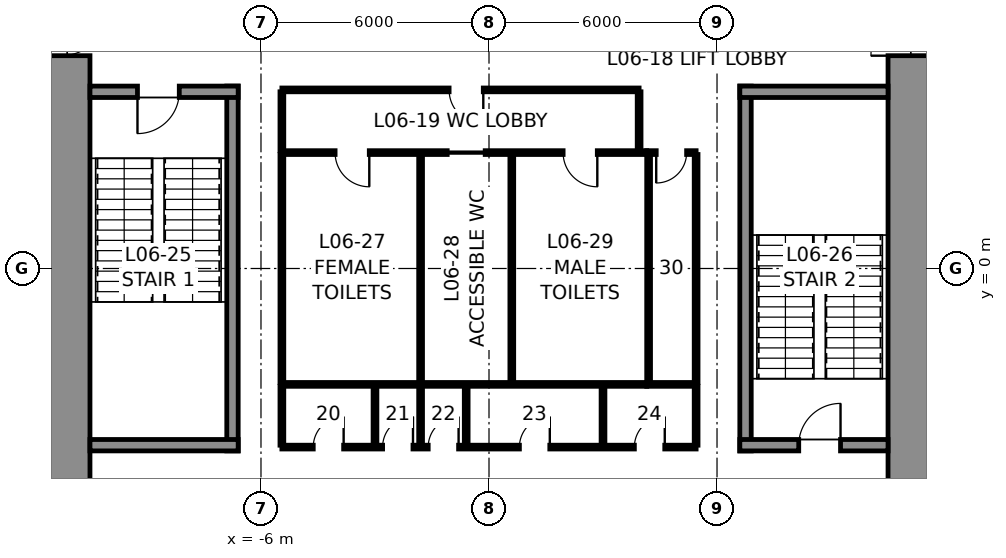
"""IFC4 building model, lengths in metres.
Left out: names, types, materials, properties, quantities, classifications, styles, units other than length and angle.
Written with IfcOpenShell. Run it as: python <this file> out.ifc"""

import sys

from ifc_helpers import new_model, si_unit, direction, frame, frame_2d, origin, place, context, subcontext, project, spatial, rectangle, extrude, element, fill, save


model = new_model("IFC4")
c1 = context("Model", 3, precision=1e-05, world=origin(), true_north=direction((0.0, 1.0)))
c2 = subcontext(c1, "Body", "Model", "MODEL_VIEW")
j1 = project(units=[si_unit("LENGTHUNIT", "METRE"), si_unit("PLANEANGLEUNIT", "RADIAN")], contexts=[c1])
p1 = place(None, origin())
s1 = spatial("IfcSite", under=j1, at=p1, CompositionType="ELEMENT")
p2 = place(p1, origin())
s2 = spatial("IfcBuilding", under=s1, at=p2, CompositionType="ELEMENT")
p3 = place(p2, frame((0.0, 0.0, 32.0)))
s3 = spatial("IfcBuildingStorey", under=s2, at=p3, CompositionType="ELEMENT", Elevation=32.0)
p4 = place(p3, frame((11.25, 10.5, 0.0), z_axis=(0.0, 0.0, 1.0), x_axis=(0.0, -1.0, 0.0)))
e1 = element("IfcWall", 1, at=p4, inside=s3, PredefinedType="SHEAR", context=c2, shape_type="SweptSolid", body=[
    extrude(rectangle(XDim=21.0, YDim=1.5, at=frame_2d((10.5, 0.0))), origin(), (0.0, 0.0, 1.0), 5.5),
])
p5 = place(p4, frame((3.7, 0.0, 0.0)))
e2 = element("IfcOpeningElement", 2, at=p5, cuts=e1, PredefinedType="OPENING", context=c2, shape_type="SweptSolid", body=[
    extrude(rectangle(XDim=1.2, YDim=2.3, at=frame_2d((0.6, 1.15))), frame((0.0, 0.76, 0.0), z_axis=(0.0, -1.0, 0.0), x_axis=(1.0, 0.0, 0.0)), (0.0, 0.0, 1.0), 1.52),
])
p6 = place(p4, frame((16.1, 0.0, 0.0)))
e3 = element("IfcOpeningElement", 3, at=p6, cuts=e1, PredefinedType="OPENING", context=c2, shape_type="SweptSolid", body=[
    extrude(rectangle(XDim=1.2, YDim=2.3, at=frame_2d((0.6, 1.15))), frame((0.0, 0.76, 0.0), z_axis=(0.0, -1.0, 0.0), x_axis=(1.0, 0.0, 0.0)), (0.0, 0.0, 1.0), 1.52),
])
p7 = place(p3, frame((-11.25, -10.5, 0.0), z_axis=(0.0, 0.0, 1.0), x_axis=(0.0, 1.0, 0.0)))
e4 = element("IfcWall", 4, at=p7, inside=s3, PredefinedType="SHEAR", context=c2, shape_type="SweptSolid", body=[
    extrude(rectangle(XDim=21.0, YDim=1.5, at=frame_2d((10.5, 0.0))), origin(), (0.0, 0.0, 1.0), 5.5),
])
p8 = place(p7, frame((16.1, 0.0, 0.0)))
e5 = element("IfcOpeningElement", 5, at=p8, cuts=e4, PredefinedType="OPENING", context=c2, shape_type="SweptSolid", body=[
    extrude(rectangle(XDim=1.2, YDim=2.3, at=frame_2d((0.6, 1.15))), frame((0.0, 0.76, 0.0), z_axis=(0.0, -1.0, 0.0), x_axis=(1.0, 0.0, 0.0)), (0.0, 0.0, 1.0), 1.52),
])
p9 = place(p7, frame((3.7, 0.0, 0.0)))
e6 = element("IfcOpeningElement", 6, at=p9, cuts=e4, PredefinedType="OPENING", context=c2, shape_type="SweptSolid", body=[
    extrude(rectangle(XDim=1.2, YDim=2.3, at=frame_2d((0.6, 1.15))), frame((0.0, 0.76, 0.0), z_axis=(0.0, -1.0, 0.0), x_axis=(1.0, 0.0, 0.0)), (0.0, 0.0, 1.0), 1.52),
])
p10 = place(p3, frame((-6.75, -4.8, 0.0), z_axis=(0.0, 0.0, 1.0), x_axis=(0.0, 1.0, 0.0)))
e7 = element("IfcWall", 7, at=p10, inside=s3, PredefinedType="SOLIDWALL", context=c2, shape_type="SweptSolid", body=[
    extrude(rectangle(XDim=9.6, YDim=0.3, at=frame_2d((4.8, 0.0))), origin(), (0.0, 0.0, 1.0), 5.25),
])
p11 = place(p3, frame((-10.5, 4.65, 0.0), z_axis=(0.0, 0.0, 1.0), x_axis=(1.0, 0.0, 0.0)))
e8 = element("IfcWall", 8, at=p11, inside=s3, PredefinedType="SOLIDWALL", context=c2, shape_type="SweptSolid", body=[
    extrude(rectangle(XDim=3.9, YDim=0.3, at=frame_2d((1.95, 0.0))), origin(), (0.0, 0.0, 1.0), 5.25),
])
p12 = place(p11, frame((1.25, 0.0, 0.0)))
e9 = element("IfcOpeningElement", 9, at=p12, cuts=e8, PredefinedType="OPENING", context=c2, shape_type="SweptSolid", body=[
    extrude(rectangle(XDim=1.1, YDim=2.3, at=frame_2d((0.55, 1.15))), frame((0.0, 0.16, 0.0), z_axis=(0.0, -1.0, 0.0), x_axis=(1.0, 0.0, 0.0)), (0.0, 0.0, 1.0), 0.32),
])
p13 = place(p3, frame((-6.6, -4.65, 0.0), z_axis=(0.0, 0.0, 1.0), x_axis=(-1.0, 0.0, 0.0)))
e10 = element("IfcWall", 10, at=p13, inside=s3, PredefinedType="SOLIDWALL", context=c2, shape_type="SweptSolid", body=[
    extrude(rectangle(XDim=3.9, YDim=0.3, at=frame_2d((1.95, 0.0))), origin(), (0.0, 0.0, 1.0), 5.25),
])
p14 = place(p3, frame((6.75, -4.8, 0.0), z_axis=(0.0, 0.0, 1.0), x_axis=(0.0, 1.0, 0.0)))
e11 = element("IfcWall", 11, at=p14, inside=s3, PredefinedType="SOLIDWALL", context=c2, shape_type="SweptSolid", body=[
    extrude(rectangle(XDim=9.6, YDim=0.3, at=frame_2d((4.8, 0.0))), origin(), (0.0, 0.0, 1.0), 5.25),
])
p15 = place(p3, frame((6.6, 4.65, 0.0), z_axis=(0.0, 0.0, 1.0), x_axis=(1.0, 0.0, 0.0)))
e12 = element("IfcWall", 12, at=p15, inside=s3, PredefinedType="SOLIDWALL", context=c2, shape_type="SweptSolid", body=[
    extrude(rectangle(XDim=3.9, YDim=0.3, at=frame_2d((1.95, 0.0))), origin(), (0.0, 0.0, 1.0), 5.25),
])
p16 = place(p3, frame((10.5, -4.65, 0.0), z_axis=(0.0, 0.0, 1.0), x_axis=(-1.0, 0.0, 0.0)))
e13 = element("IfcWall", 13, at=p16, inside=s3, PredefinedType="SOLIDWALL", context=c2, shape_type="SweptSolid", body=[
    extrude(rectangle(XDim=3.9, YDim=0.3, at=frame_2d((1.95, 0.0))), origin(), (0.0, 0.0, 1.0), 5.25),
])
p17 = place(p16, frame((1.25, 0.0, 0.0)))
e14 = element("IfcOpeningElement", 14, at=p17, cuts=e13, PredefinedType="OPENING", context=c2, shape_type="SweptSolid", body=[
    extrude(rectangle(XDim=1.1, YDim=2.3, at=frame_2d((0.55, 1.15))), frame((0.0, 0.16, 0.0), z_axis=(0.0, -1.0, 0.0), x_axis=(1.0, 0.0, 0.0)), (0.0, 0.0, 1.0), 0.32),
])
p18 = place(p3, frame((-5.45, 3.05, 0.0), z_axis=(0.0, 0.0, 1.0), x_axis=(1.0, 0.0, 0.0)))
e15 = element("IfcWall", 15, at=p18, inside=s3, PredefinedType="PARTITIONING", context=c2, shape_type="SweptSolid", body=[
    extrude(rectangle(XDim=9.6, YDim=0.1, at=frame_2d((4.8, 0.0))), origin(), (0.0, 0.0, 1.0), 5.25),
])
p19 = place(p18, frame((1.4, 0.0, 0.0)))
e16 = element("IfcOpeningElement", 16, at=p19, cuts=e15, PredefinedType="OPENING", context=c2, shape_type="SweptSolid", body=[
    extrude(rectangle(XDim=0.9, YDim=2.3, at=frame_2d((0.45, 1.15))), frame((0.0, 0.06, 0.0), z_axis=(0.0, -1.0, 0.0), x_axis=(1.0, 0.0, 0.0)), (0.0, 0.0, 1.0), 0.12),
])
p20 = place(p18, frame((4.35, 0.0, 0.0)))
e17 = element("IfcOpeningElement", 17, at=p20, cuts=e15, PredefinedType="OPENING", context=c2, shape_type="SweptSolid", body=[
    extrude(rectangle(XDim=1.0, YDim=2.3, at=frame_2d((0.5, 1.15))), frame((0.0, 0.06, 0.0), z_axis=(0.0, -1.0, 0.0), x_axis=(1.0, 0.0, 0.0)), (0.0, 0.0, 1.0), 0.12),
])
p21 = place(p18, frame((7.4, 0.0, 0.0)))
e18 = element("IfcOpeningElement", 18, at=p21, cuts=e15, PredefinedType="OPENING", context=c2, shape_type="SweptSolid", body=[
    extrude(rectangle(XDim=0.9, YDim=2.3, at=frame_2d((0.45, 1.15))), frame((0.0, 0.06, 0.0), z_axis=(0.0, -1.0, 0.0), x_axis=(1.0, 0.0, 0.0)), (0.0, 0.0, 1.0), 0.12),
])
p22 = place(p3, frame((4.15, 3.05, 0.0), z_axis=(0.0, 0.0, 1.0), x_axis=(1.0, 0.0, 0.0)))
e19 = element("IfcWall", 19, at=p22, inside=s3, PredefinedType="PARTITIONING", context=c2, shape_type="SweptSolid", body=[
    extrude(rectangle(XDim=1.3, YDim=0.1, at=frame_2d((0.65, 0.0))), origin(), (0.0, 0.0, 1.0), 5.25),
])
p23 = place(p22, frame((0.25, 0.0, 0.0)))
e20 = element("IfcOpeningElement", 20, at=p23, cuts=e19, PredefinedType="OPENING", context=c2, shape_type="SweptSolid", body=[
    extrude(rectangle(XDim=0.8, YDim=2.3, at=frame_2d((0.4, 1.15))), frame((0.0, 0.06, 0.0), z_axis=(0.0, -1.0, 0.0), x_axis=(1.0, 0.0, 0.0)), (0.0, 0.0, 1.0), 0.12),
])
p24 = place(p3, frame((4.15, -3.05, 0.0), z_axis=(0.0, 0.0, 1.0), x_axis=(-1.0, 0.0, 0.0)))
e21 = element("IfcWall", 21, at=p24, inside=s3, PredefinedType="PARTITIONING", context=c2, shape_type="SweptSolid", body=[
    extrude(rectangle(XDim=9.6, YDim=0.1, at=frame_2d((4.8, 0.0))), origin(), (0.0, 0.0, 1.0), 5.25),
])
p25 = place(p3, frame((5.45, -3.05, 0.0), z_axis=(0.0, 0.0, 1.0), x_axis=(-1.0, 0.0, 0.0)))
e22 = element("IfcWall", 22, at=p25, inside=s3, PredefinedType="PARTITIONING", context=c2, shape_type="SweptSolid", body=[
    extrude(rectangle(XDim=1.3, YDim=0.1, at=frame_2d((0.65, 0.0))), origin(), (0.0, 0.0, 1.0), 5.25),
])
for number, where, z_axis, x_axis in (
    (23, (5.45, 3.0, 0.0), (0.0, 0.0, 1.0), (0.0, -1.0, 0.0)),
    (24, (-5.45, -3.0, 0.0), (0.0, 0.0, 1.0), (0.0, 1.0, 0.0)),
    (25, (-1.8, -3.0, 0.0), (0.0, 0.0, 1.0), (0.0, 1.0, 0.0)),
    (26, (0.6, -3.0, 0.0), (0.0, 0.0, 1.0), (0.0, 1.0, 0.0)),
    (27, (4.2, -3.0, 0.0), (0.0, 0.0, 1.0), (0.0, 1.0, 0.0)),
):
    element("IfcWall", number, at=place(p3, frame(where, z_axis=z_axis, x_axis=x_axis)), inside=s3, PredefinedType="PARTITIONING", context=c2, shape_type="SweptSolid", body=[
        extrude(rectangle(XDim=6.0, YDim=0.1, at=frame_2d((3.0, 0.0))), origin(), (0.0, 0.0, 1.0), 5.25),
    ])
p26 = place(p3, frame((-5.45, 4.7, 0.0), z_axis=(0.0, 0.0, 1.0), x_axis=(1.0, 0.0, 0.0)))
e28 = element("IfcWall", 28, at=p26, inside=s3, PredefinedType="PARTITIONING", context=c2, shape_type="SweptSolid", body=[
    extrude(rectangle(XDim=9.4, YDim=0.1, at=frame_2d((4.7, 0.0))), origin(), (0.0, 0.0, 1.0), 5.25),
])
p27 = place(p26, frame((4.4, 0.0, 0.0)))
e29 = element("IfcOpeningElement", 29, at=p27, cuts=e28, PredefinedType="OPENING", context=c2, shape_type="SweptSolid", body=[
    extrude(rectangle(XDim=0.9, YDim=2.3, at=frame_2d((0.45, 1.15))), frame((0.0, 0.06, 0.0), z_axis=(0.0, -1.0, 0.0), x_axis=(1.0, 0.0, 0.0)), (0.0, 0.0, 1.0), 0.12),
])
for number, where, z_axis, x_axis in (
    (30, (-5.45, 3.1, 0.0), (0.0, 0.0, 1.0), (0.0, 1.0, 0.0)),
    (31, (3.95, 3.1, 0.0), (0.0, 0.0, 1.0), (0.0, 1.0, 0.0)),
):
    element("IfcWall", number, at=place(p3, frame(where, z_axis=z_axis, x_axis=x_axis)), inside=s3, PredefinedType="PARTITIONING", context=c2, shape_type="SweptSolid", body=[
        extrude(rectangle(XDim=1.55, YDim=0.1, at=frame_2d((0.775, 0.0))), origin(), (0.0, 0.0, 1.0), 5.25),
    ])
p28 = place(p3, frame((5.45, -4.7, 0.0), z_axis=(0.0, 0.0, 1.0), x_axis=(-1.0, 0.0, 0.0)))
e32 = element("IfcWall", 32, at=p28, inside=s3, PredefinedType="PARTITIONING", context=c2, shape_type="SweptSolid", body=[
    extrude(rectangle(XDim=10.9, YDim=0.1, at=frame_2d((5.45, 0.0))), origin(), (0.0, 0.0, 1.0), 5.25),
])
p29 = place(p28, frame((9.275, 0.0, 0.0)))
e33 = element("IfcOpeningElement", 33, at=p29, cuts=e32, PredefinedType="OPENING", context=c2, shape_type="SweptSolid", body=[
    extrude(rectangle(XDim=0.8, YDim=2.3, at=frame_2d((0.4, 1.15))), frame((0.0, 0.06, 0.0), z_axis=(0.0, -1.0, 0.0), x_axis=(1.0, 0.0, 0.0)), (0.0, 0.0, 1.0), 0.12),
])
p30 = place(p28, frame((7.45, 0.0, 0.0)))
e34 = element("IfcOpeningElement", 34, at=p30, cuts=e32, PredefinedType="OPENING", context=c2, shape_type="SweptSolid", body=[
    extrude(rectangle(XDim=0.8, YDim=2.3, at=frame_2d((0.4, 1.15))), frame((0.0, 0.06, 0.0), z_axis=(0.0, -1.0, 0.0), x_axis=(1.0, 0.0, 0.0)), (0.0, 0.0, 1.0), 0.12),
])
p31 = place(p28, frame((6.25, 0.0, 0.0)))
e35 = element("IfcOpeningElement", 35, at=p31, cuts=e32, PredefinedType="OPENING", context=c2, shape_type="SweptSolid", body=[
    extrude(rectangle(XDim=0.8, YDim=2.3, at=frame_2d((0.4, 1.15))), frame((0.0, 0.06, 0.0), z_axis=(0.0, -1.0, 0.0), x_axis=(1.0, 0.0, 0.0)), (0.0, 0.0, 1.0), 0.12),
])
p32 = place(p28, frame((3.85, 0.0, 0.0)))
e36 = element("IfcOpeningElement", 36, at=p32, cuts=e32, PredefinedType="OPENING", context=c2, shape_type="SweptSolid", body=[
    extrude(rectangle(XDim=0.8, YDim=2.3, at=frame_2d((0.4, 1.15))), frame((0.0, 0.06, 0.0), z_axis=(0.0, -1.0, 0.0), x_axis=(1.0, 0.0, 0.0)), (0.0, 0.0, 1.0), 0.12),
])
p33 = place(p28, frame((0.825, 0.0, 0.0)))
e37 = element("IfcOpeningElement", 37, at=p33, cuts=e32, PredefinedType="OPENING", context=c2, shape_type="SweptSolid", body=[
    extrude(rectangle(XDim=0.8, YDim=2.3, at=frame_2d((0.4, 1.15))), frame((0.0, 0.06, 0.0), z_axis=(0.0, -1.0, 0.0), x_axis=(1.0, 0.0, 0.0)), (0.0, 0.0, 1.0), 0.12),
])
for number, where, z_axis, x_axis in (
    (38, (-5.45, -3.1, 0.0), (0.0, 0.0, 1.0), (0.0, -1.0, 0.0)),
    (39, (5.45, -3.1, 0.0), (0.0, 0.0, 1.0), (0.0, -1.0, 0.0)),
    (40, (-3.0, -3.1, 0.0), (0.0, 0.0, 1.0), (0.0, -1.0, 0.0)),
    (41, (-1.8, -3.1, 0.0), (0.0, 0.0, 1.0), (0.0, -1.0, 0.0)),
    (42, (-0.6, -3.1, 0.0), (0.0, 0.0, 1.0), (0.0, -1.0, 0.0)),
    (43, (3.0, -3.1, 0.0), (0.0, 0.0, 1.0), (0.0, -1.0, 0.0)),
):
    element("IfcWall", number, at=place(p3, frame(where, z_axis=z_axis, x_axis=x_axis)), inside=s3, PredefinedType="PARTITIONING", context=c2, shape_type="SweptSolid", body=[
        extrude(rectangle(XDim=1.55, YDim=0.1, at=frame_2d((0.775, 0.0))), origin(), (0.0, 0.0, 1.0), 5.25),
    ])
p34 = place(p12, frame((1.1, 0.0, 0.0), z_axis=(0.0, 0.0, 1.0), x_axis=(-1.0, 0.0, 0.0)))
e44 = element("IfcDoor", 44, at=p34, inside=s3, OperationType="SINGLE_SWING_RIGHT", PredefinedType="DOOR", context=c2, shape_type="SweptSolid", body=[
    extrude(rectangle(XDim=1.1, YDim=2.3, at=frame_2d((0.55, 1.15))), frame((0.0, 0.025, 0.0), z_axis=(0.0, -1.0, 0.0), x_axis=(1.0, 0.0, 0.0)), (0.0, 0.0, 1.0), 0.05),
])
fill(e9, e44)
p35 = place(p17, frame((1.1, 0.0, 0.0), z_axis=(0.0, 0.0, 1.0), x_axis=(-1.0, 0.0, 0.0)))
e45 = element("IfcDoor", 45, at=p35, inside=s3, OperationType="SINGLE_SWING_RIGHT", PredefinedType="DOOR", context=c2, shape_type="SweptSolid", body=[
    extrude(rectangle(XDim=1.1, YDim=2.3, at=frame_2d((0.55, 1.15))), frame((0.0, 0.025, 0.0), z_axis=(0.0, -1.0, 0.0), x_axis=(1.0, 0.0, 0.0)), (0.0, 0.0, 1.0), 0.05),
])
fill(e14, e45)
p36 = place(p19, frame((0.9, 0.0, 0.0), z_axis=(0.0, 0.0, 1.0), x_axis=(-1.0, 0.0, 0.0)))
e46 = element("IfcDoor", 46, at=p36, inside=s3, OperationType="SINGLE_SWING_LEFT", PredefinedType="DOOR", context=c2, shape_type="SweptSolid", body=[
    extrude(rectangle(XDim=0.9, YDim=2.3, at=frame_2d((0.45, 1.15))), frame((0.0, 0.025, 0.0), z_axis=(0.0, -1.0, 0.0), x_axis=(1.0, 0.0, 0.0)), (0.0, 0.0, 1.0), 0.05),
])
fill(e16, e46)
p37 = place(p20, frame((1.0, 0.0, 0.0), z_axis=(0.0, 0.0, 1.0), x_axis=(-1.0, 0.0, 0.0)))
e47 = element("IfcDoor", 47, at=p37, inside=s3, OperationType="SLIDING_TO_LEFT", PredefinedType="DOOR", context=c2, shape_type="SweptSolid", body=[
    extrude(rectangle(XDim=1.0, YDim=2.3, at=frame_2d((0.5, 1.15))), frame((0.0, 0.025, 0.0), z_axis=(0.0, -1.0, 0.0), x_axis=(1.0, 0.0, 0.0)), (0.0, 0.0, 1.0), 0.05),
])
fill(e17, e47)
p38 = place(p21, frame((0.9, 0.0, 0.0), z_axis=(0.0, 0.0, 1.0), x_axis=(-1.0, 0.0, 0.0)))
e48 = element("IfcDoor", 48, at=p38, inside=s3, OperationType="SINGLE_SWING_LEFT", PredefinedType="DOOR", context=c2, shape_type="SweptSolid", body=[
    extrude(rectangle(XDim=0.9, YDim=2.3, at=frame_2d((0.45, 1.15))), frame((0.0, 0.025, 0.0), z_axis=(0.0, -1.0, 0.0), x_axis=(1.0, 0.0, 0.0)), (0.0, 0.0, 1.0), 0.05),
])
fill(e18, e48)
p39 = place(p23, frame((0.8, 0.0, 0.0), z_axis=(0.0, 0.0, 1.0), x_axis=(-1.0, 0.0, 0.0)))
e49 = element("IfcDoor", 49, at=p39, inside=s3, OperationType="SINGLE_SWING_RIGHT", PredefinedType="DOOR", context=c2, shape_type="SweptSolid", body=[
    extrude(rectangle(XDim=0.8, YDim=2.3, at=frame_2d((0.4, 1.15))), frame((0.0, 0.025, 0.0), z_axis=(0.0, -1.0, 0.0), x_axis=(1.0, 0.0, 0.0)), (0.0, 0.0, 1.0), 0.05),
])
fill(e20, e49)
p40 = place(p27, frame((0.9, 0.0, 0.0), z_axis=(0.0, 0.0, 1.0), x_axis=(-1.0, 0.0, 0.0)))
e50 = element("IfcDoor", 50, at=p40, inside=s3, OperationType="SINGLE_SWING_LEFT", PredefinedType="DOOR", context=c2, shape_type="SweptSolid", body=[
    extrude(rectangle(XDim=0.9, YDim=2.3, at=frame_2d((0.45, 1.15))), frame((0.0, 0.025, 0.0), z_axis=(0.0, -1.0, 0.0), x_axis=(1.0, 0.0, 0.0)), (0.0, 0.0, 1.0), 0.05),
])
fill(e29, e50)
p41 = place(p29, frame((0.8, 0.0, 0.0), z_axis=(0.0, 0.0, 1.0), x_axis=(-1.0, 0.0, 0.0)))
e51 = element("IfcDoor", 51, at=p41, inside=s3, OperationType="SINGLE_SWING_RIGHT", PredefinedType="DOOR", context=c2, shape_type="SweptSolid", body=[
    extrude(rectangle(XDim=0.8, YDim=2.3, at=frame_2d((0.4, 1.15))), frame((0.0, 0.025, 0.0), z_axis=(0.0, -1.0, 0.0), x_axis=(1.0, 0.0, 0.0)), (0.0, 0.0, 1.0), 0.05),
])
fill(e33, e51)
p42 = place(p30, frame((0.8, 0.0, 0.0), z_axis=(0.0, 0.0, 1.0), x_axis=(-1.0, 0.0, 0.0)))
e52 = element("IfcDoor", 52, at=p42, inside=s3, OperationType="SINGLE_SWING_RIGHT", PredefinedType="DOOR", context=c2, shape_type="SweptSolid", body=[
    extrude(rectangle(XDim=0.8, YDim=2.3, at=frame_2d((0.4, 1.15))), frame((0.0, 0.025, 0.0), z_axis=(0.0, -1.0, 0.0), x_axis=(1.0, 0.0, 0.0)), (0.0, 0.0, 1.0), 0.05),
])
fill(e34, e52)
p43 = place(p31, frame((0.8, 0.0, 0.0), z_axis=(0.0, 0.0, 1.0), x_axis=(-1.0, 0.0, 0.0)))
e53 = element("IfcDoor", 53, at=p43, inside=s3, OperationType="SINGLE_SWING_RIGHT", PredefinedType="DOOR", context=c2, shape_type="SweptSolid", body=[
    extrude(rectangle(XDim=0.8, YDim=2.3, at=frame_2d((0.4, 1.15))), frame((0.0, 0.025, 0.0), z_axis=(0.0, -1.0, 0.0), x_axis=(1.0, 0.0, 0.0)), (0.0, 0.0, 1.0), 0.05),
])
fill(e35, e53)
p44 = place(p32, frame((0.8, 0.0, 0.0), z_axis=(0.0, 0.0, 1.0), x_axis=(-1.0, 0.0, 0.0)))
e54 = element("IfcDoor", 54, at=p44, inside=s3, OperationType="SINGLE_SWING_RIGHT", PredefinedType="DOOR", context=c2, shape_type="SweptSolid", body=[
    extrude(rectangle(XDim=0.8, YDim=2.3, at=frame_2d((0.4, 1.15))), frame((0.0, 0.025, 0.0), z_axis=(0.0, -1.0, 0.0), x_axis=(1.0, 0.0, 0.0)), (0.0, 0.0, 1.0), 0.05),
])
fill(e36, e54)
p45 = place(p33, frame((0.8, 0.0, 0.0), z_axis=(0.0, 0.0, 1.0), x_axis=(-1.0, 0.0, 0.0)))
e55 = element("IfcDoor", 55, at=p45, inside=s3, OperationType="SINGLE_SWING_RIGHT", PredefinedType="DOOR", context=c2, shape_type="SweptSolid", body=[
    extrude(rectangle(XDim=0.8, YDim=2.3, at=frame_2d((0.4, 1.15))), frame((0.0, 0.025, 0.0), z_axis=(0.0, -1.0, 0.0), x_axis=(1.0, 0.0, 0.0)), (0.0, 0.0, 1.0), 0.05),
])
fill(e37, e55)
p46 = place(p8, frame((1.2, 0.0, 0.0), z_axis=(0.0, 0.0, 1.0), x_axis=(-1.0, 0.0, 0.0)))
e56 = element("IfcDoor", 56, at=p46, inside=s3, OperationType="SINGLE_SWING_LEFT", PredefinedType="DOOR", context=c2, shape_type="SweptSolid", body=[
    extrude(rectangle(XDim=1.2, YDim=2.3, at=frame_2d((0.6, 1.15))), frame((0.0, 0.025, 0.0), z_axis=(0.0, -1.0, 0.0), x_axis=(1.0, 0.0, 0.0)), (0.0, 0.0, 1.0), 0.05),
])
fill(e5, e56)
p47 = place(p5, frame((1.2, 0.0, 0.0), z_axis=(0.0, 0.0, 1.0), x_axis=(-1.0, 0.0, 0.0)))
e57 = element("IfcDoor", 57, at=p47, inside=s3, OperationType="SINGLE_SWING_LEFT", PredefinedType="DOOR", context=c2, shape_type="SweptSolid", body=[
    extrude(rectangle(XDim=1.2, YDim=2.3, at=frame_2d((0.6, 1.15))), frame((0.0, 0.025, 0.0), z_axis=(0.0, -1.0, 0.0), x_axis=(1.0, 0.0, 0.0)), (0.0, 0.0, 1.0), 0.05),
])
fill(e2, e57)
save(model, sys.argv[1])
